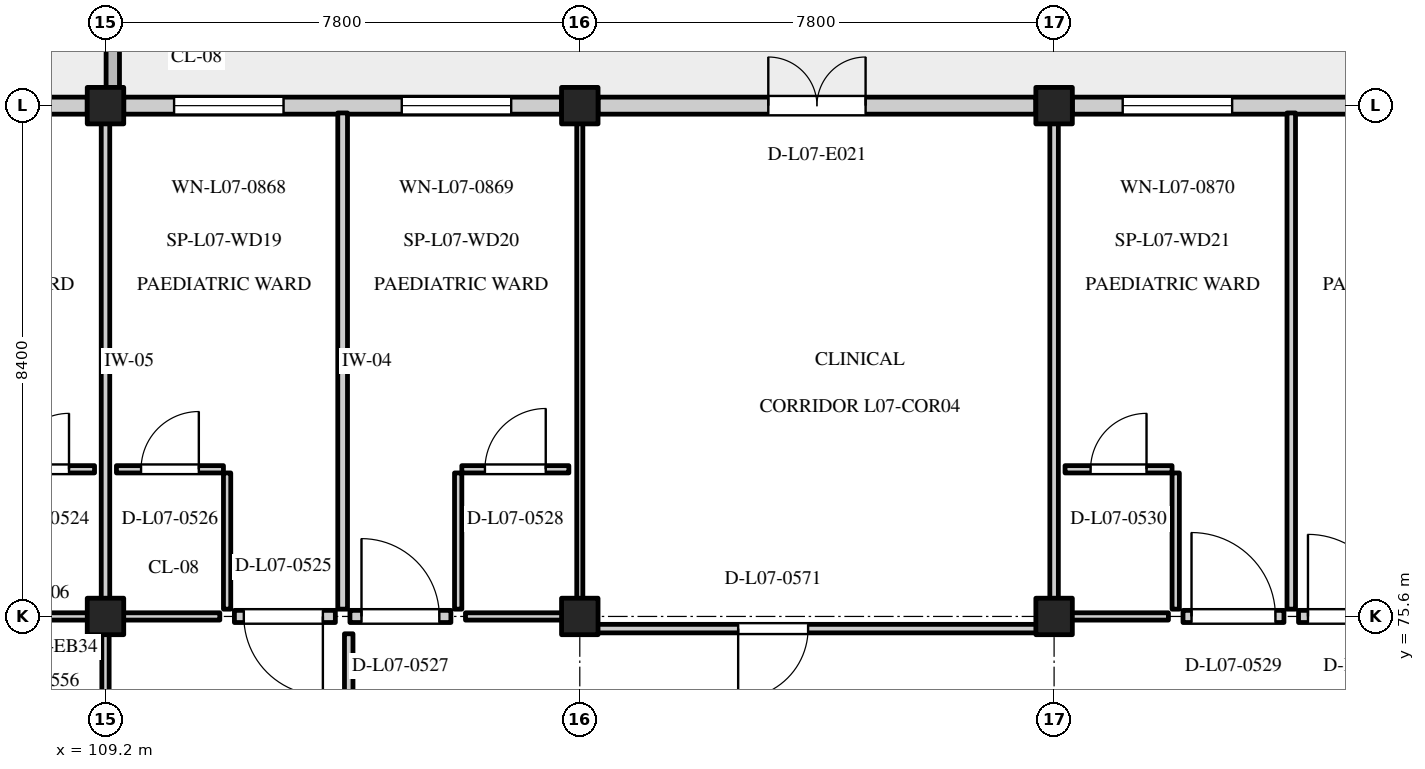
"""IFC4 building model, lengths in metres.
Left out: names, types, materials, properties, quantities, classifications, styles, units other than length and angle.
Written with IfcOpenShell. Run it as: python <this file> out.ifc"""

import sys

from ifc_helpers import new_model, si_unit, direction, frame, frame_2d, origin, origin_2d, place, context, subcontext, project, spatial, rectangle, extrude, element, fill, save


model = new_model("IFC4")
c1 = context("Model", 3, precision=1e-05, world=origin(), true_north=direction((0.0, 1.0)))
c2 = subcontext(c1, "Body", "Model", "MODEL_VIEW")
j1 = project(units=[si_unit("LENGTHUNIT", "METRE"), si_unit("PLANEANGLEUNIT", "RADIAN")], contexts=[c1])
p1 = place(None, origin())
s1 = spatial("IfcSite", under=j1, at=p1, CompositionType="ELEMENT")
p2 = place(p1, origin())
s2 = spatial("IfcBuilding", under=s1, at=p2, CompositionType="ELEMENT")
p3 = place(p2, frame((0.0, 0.0, 29.7)))
s3 = spatial("IfcBuildingStorey", under=s2, at=p3, CompositionType="ELEMENT", Elevation=29.7)
for number, where, z_axis, x_axis in (
    (1, (109.2, 75.6, 0.0), (0.0, 0.0, 1.0), (1.0, 0.0, 0.0)),
    (2, (109.2, 84.0, 0.0), (0.0, 0.0, 1.0), (1.0, 0.0, 0.0)),
    (3, (117.0, 75.6, 0.0), (0.0, 0.0, 1.0), (1.0, 0.0, 0.0)),
    (4, (117.0, 84.0, 0.0), (0.0, 0.0, 1.0), (1.0, 0.0, 0.0)),
    (5, (124.8, 75.6, 0.0), (0.0, 0.0, 1.0), (1.0, 0.0, 0.0)),
    (6, (124.8, 84.0, 0.0), (0.0, 0.0, 1.0), (1.0, 0.0, 0.0)),
):
    element("IfcColumn", number, at=place(p3, frame(where, z_axis=z_axis, x_axis=x_axis)), inside=s3, PredefinedType="COLUMN", context=c2, shape_type="SweptSolid", body=[
        extrude(rectangle(XDim=0.6, YDim=0.6, at=origin_2d()), origin(), (0.0, 0.0, 1.0), 4.2),
    ])
p4 = place(p3, frame((101.7, 84.0, 0.0), z_axis=(0.0, 0.0, 1.0), x_axis=(1.0, 0.0, 0.0)))
e7 = element("IfcWall", 7, at=p4, inside=s3, PredefinedType="STANDARD", context=c2, shape_type="SweptSolid", body=[
    extrude(rectangle(XDim=7.2, YDim=0.28, at=frame_2d((3.6, 0.0))), origin(), (0.0, 0.0, 1.0), 3.25),
])
p5 = place(p4, frame((0.728, 0.0, 0.8)))
e8 = element("IfcOpeningElement", 8, at=p5, cuts=e7, PredefinedType="OPENING", context=c2, shape_type="SweptSolid", body=[
    extrude(rectangle(XDim=2.0, YDim=1.45, at=frame_2d((1.0, 0.725))), frame((0.0, 0.152, 0.0), z_axis=(0.0, -1.0, 0.0), x_axis=(1.0, 0.0, 0.0)), (0.0, 0.0, 1.0), 0.304),
])
p6 = place(p4, frame((4.472, 0.0, 0.8)))
e9 = element("IfcOpeningElement", 9, at=p6, cuts=e7, PredefinedType="OPENING", context=c2, shape_type="SweptSolid", body=[
    extrude(rectangle(XDim=2.0, YDim=1.45, at=frame_2d((1.0, 0.725))), frame((0.0, 0.152, 0.0), z_axis=(0.0, -1.0, 0.0), x_axis=(1.0, 0.0, 0.0)), (0.0, 0.0, 1.0), 0.304),
])
p7 = place(p3, frame((109.5, 84.0, 0.0), z_axis=(0.0, 0.0, 1.0), x_axis=(1.0, 0.0, 0.0)))
e10 = element("IfcWall", 10, at=p7, inside=s3, PredefinedType="STANDARD", context=c2, shape_type="SweptSolid", body=[
    extrude(rectangle(XDim=7.2, YDim=0.28, at=frame_2d((3.6, 0.0))), origin(), (0.0, 0.0, 1.0), 3.25),
])
p8 = place(p7, frame((0.828, 0.0, 0.8)))
e11 = element("IfcOpeningElement", 11, at=p8, cuts=e10, PredefinedType="OPENING", context=c2, shape_type="SweptSolid", body=[
    extrude(rectangle(XDim=1.8, YDim=1.75, at=frame_2d((0.9, 0.875))), frame((0.0, 0.152, 0.0), z_axis=(0.0, -1.0, 0.0), x_axis=(1.0, 0.0, 0.0)), (0.0, 0.0, 1.0), 0.304),
])
p9 = place(p7, frame((4.572, 0.0, 0.8)))
e12 = element("IfcOpeningElement", 12, at=p9, cuts=e10, PredefinedType="OPENING", context=c2, shape_type="SweptSolid", body=[
    extrude(rectangle(XDim=1.8, YDim=1.75, at=frame_2d((0.9, 0.875))), frame((0.0, 0.152, 0.0), z_axis=(0.0, -1.0, 0.0), x_axis=(1.0, 0.0, 0.0)), (0.0, 0.0, 1.0), 0.304),
])
p10 = place(p3, frame((117.3, 84.0, 0.0), z_axis=(0.0, 0.0, 1.0), x_axis=(1.0, 0.0, 0.0)))
e13 = element("IfcWall", 13, at=p10, inside=s3, PredefinedType="STANDARD", context=c2, shape_type="SweptSolid", body=[
    extrude(rectangle(XDim=7.2, YDim=0.28, at=frame_2d((3.6, 0.0))), origin(), (0.0, 0.0, 1.0), 3.25),
])
p11 = place(p10, frame((2.8, 0.0, 0.0)))
e14 = element("IfcOpeningElement", 14, at=p11, cuts=e13, PredefinedType="OPENING", context=c2, shape_type="SweptSolid", body=[
    extrude(rectangle(XDim=1.6, YDim=2.15, at=frame_2d((0.8, 1.075))), frame((0.0, 0.152, 0.0), z_axis=(0.0, -1.0, 0.0), x_axis=(1.0, 0.0, 0.0)), (0.0, 0.0, 1.0), 0.304),
])
p12 = place(p3, frame((125.1, 84.0, 0.0), z_axis=(0.0, 0.0, 1.0), x_axis=(1.0, 0.0, 0.0)))
e15 = element("IfcWall", 15, at=p12, inside=s3, PredefinedType="STANDARD", context=c2, shape_type="SweptSolid", body=[
    extrude(rectangle(XDim=7.2, YDim=0.28, at=frame_2d((3.6, 0.0))), origin(), (0.0, 0.0, 1.0), 3.25),
])
p13 = place(p12, frame((0.828, 0.0, 0.8)))
e16 = element("IfcOpeningElement", 16, at=p13, cuts=e15, PredefinedType="OPENING", context=c2, shape_type="SweptSolid", body=[
    extrude(rectangle(XDim=1.8, YDim=1.55, at=frame_2d((0.9, 0.775))), frame((0.0, 0.152, 0.0), z_axis=(0.0, -1.0, 0.0), x_axis=(1.0, 0.0, 0.0)), (0.0, 0.0, 1.0), 0.304),
])
p14 = place(p12, frame((4.572, 0.0, 0.8)))
e17 = element("IfcOpeningElement", 17, at=p14, cuts=e15, PredefinedType="OPENING", context=c2, shape_type="SweptSolid", body=[
    extrude(rectangle(XDim=1.8, YDim=1.55, at=frame_2d((0.9, 0.775))), frame((0.0, 0.152, 0.0), z_axis=(0.0, -1.0, 0.0), x_axis=(1.0, 0.0, 0.0)), (0.0, 0.0, 1.0), 0.304),
])
p15 = place(p3, frame((109.32, 84.05, 0.0), z_axis=(0.0, 0.0, 1.0), x_axis=(0.0, 1.0, 0.0)))
e18 = element("IfcWall", 18, at=p15, inside=s3, PredefinedType="PARAPET", context=c2, shape_type="SweptSolid", body=[
    extrude(rectangle(XDim=8.3, YDim=0.22, at=frame_2d((4.15, 0.0))), origin(), (0.0, 0.0, 1.0), 1.15),
])
p16 = place(p3, frame((109.2, 75.72, 0.0), z_axis=(0.0, 0.0, 1.0), x_axis=(0.0, 1.0, 0.0)))
e19 = element("IfcWall", 19, at=p16, inside=s3, PredefinedType="PARTITIONING", context=c2, shape_type="SweptSolid", body=[
    extrude(rectangle(XDim=8.16, YDim=0.14, at=frame_2d((4.08, 0.0))), origin(), (0.0, 0.0, 1.0), 3.88),
])
p17 = place(p3, frame((107.32, 75.6, 0.0), z_axis=(0.0, 0.0, 1.0), x_axis=(1.0, 0.0, 0.0)))
e20 = element("IfcWall", 20, at=p17, inside=s3, PredefinedType="PARTITIONING", context=c2, shape_type="SweptSolid", body=[
    extrude(rectangle(XDim=1.76, YDim=0.12, at=frame_2d((0.88, 0.0))), origin(), (0.0, 0.0, 1.0), 3.25),
])
p18 = place(p3, frame((107.26, 78.02, 0.0), z_axis=(0.0, 0.0, 1.0), x_axis=(1.0, 0.0, 0.0)))
e21 = element("IfcWall", 21, at=p18, inside=s3, PredefinedType="PARTITIONING", context=c2, shape_type="SweptSolid", body=[
    extrude(rectangle(XDim=1.76, YDim=0.12, at=frame_2d((0.88, 0.0))), origin(), (0.0, 0.0, 1.0), 3.88),
])
p19 = place(p18, frame((0.42, 0.0, 0.0)))
e22 = element("IfcOpeningElement", 22, at=p19, cuts=e21, PredefinedType="OPENING", context=c2, shape_type="SweptSolid", body=[
    extrude(rectangle(XDim=0.92, YDim=2.08, at=frame_2d((0.46, 1.04))), frame((0.0, 0.072, 0.0), z_axis=(0.0, -1.0, 0.0), x_axis=(1.0, 0.0, 0.0)), (0.0, 0.0, 1.0), 0.144),
])
p20 = place(p3, frame((113.1, 75.72, 0.0), z_axis=(0.0, 0.0, 1.0), x_axis=(0.0, 1.0, 0.0)))
e23 = element("IfcWall", 23, at=p20, inside=s3, PredefinedType="PARTITIONING", context=c2, shape_type="SweptSolid", body=[
    extrude(rectangle(XDim=8.16, YDim=0.16, at=frame_2d((4.08, 0.0))), origin(), (0.0, 0.0, 1.0), 3.88),
])
p21 = place(p3, frame((111.32, 75.6, 0.0), z_axis=(0.0, 0.0, 1.0), x_axis=(1.0, 0.0, 0.0)))
e24 = element("IfcWall", 24, at=p21, inside=s3, PredefinedType="STANDARD", context=c2, shape_type="SweptSolid", body=[
    extrude(rectangle(XDim=1.66, YDim=0.2, at=frame_2d((0.83, 0.0))), origin(), (0.0, 0.0, 1.0), 3.25),
])
p22 = place(p21, frame((0.155, 0.0, 0.0)))
e25 = element("IfcOpeningElement", 25, at=p22, cuts=e24, PredefinedType="OPENING", context=c2, shape_type="SweptSolid", body=[
    extrude(rectangle(XDim=1.3, YDim=2.15, at=frame_2d((0.65, 1.075))), frame((0.0, 0.112, 0.0), z_axis=(0.0, -1.0, 0.0), x_axis=(1.0, 0.0, 0.0)), (0.0, 0.0, 1.0), 0.224),
])
p23 = place(p3, frame((109.32, 75.6, 0.0), z_axis=(0.0, 0.0, 1.0), x_axis=(1.0, 0.0, 0.0)))
e26 = element("IfcWall", 26, at=p23, inside=s3, PredefinedType="PARTITIONING", context=c2, shape_type="SweptSolid", body=[
    extrude(rectangle(XDim=1.76, YDim=0.12, at=frame_2d((0.88, 0.0))), origin(), (0.0, 0.0, 1.0), 3.25),
])
p24 = place(p3, frame((111.2, 75.72, 0.0), z_axis=(0.0, 0.0, 1.0), x_axis=(0.0, 1.0, 0.0)))
e27 = element("IfcWall", 27, at=p24, inside=s3, PredefinedType="PARTITIONING", context=c2, shape_type="SweptSolid", body=[
    extrude(rectangle(XDim=2.24, YDim=0.12, at=frame_2d((1.12, 0.0))), origin(), (0.0, 0.0, 1.0), 3.88),
])
p25 = place(p3, frame((109.38, 78.02, 0.0), z_axis=(0.0, 0.0, 1.0), x_axis=(1.0, 0.0, 0.0)))
e28 = element("IfcWall", 28, at=p25, inside=s3, PredefinedType="PARTITIONING", context=c2, shape_type="SweptSolid", body=[
    extrude(rectangle(XDim=1.76, YDim=0.12, at=frame_2d((0.88, 0.0))), origin(), (0.0, 0.0, 1.0), 3.88),
])
p26 = place(p25, frame((0.405, 0.0, 0.0)))
e29 = element("IfcOpeningElement", 29, at=p26, cuts=e28, PredefinedType="OPENING", context=c2, shape_type="SweptSolid", body=[
    extrude(rectangle(XDim=0.95, YDim=2.1, at=frame_2d((0.475, 1.05))), frame((0.0, 0.072, 0.0), z_axis=(0.0, -1.0, 0.0), x_axis=(1.0, 0.0, 0.0)), (0.0, 0.0, 1.0), 0.144),
])
p27 = place(p3, frame((117.0, 75.72, 0.0), z_axis=(0.0, 0.0, 1.0), x_axis=(0.0, 1.0, 0.0)))
e30 = element("IfcWall", 30, at=p27, inside=s3, PredefinedType="PARTITIONING", context=c2, shape_type="SweptSolid", body=[
    extrude(rectangle(XDim=8.16, YDim=0.1, at=frame_2d((4.08, 0.0))), origin(), (0.0, 0.0, 1.0), 3.25),
])
p28 = place(p3, frame((113.22, 75.6, 0.0), z_axis=(0.0, 0.0, 1.0), x_axis=(1.0, 0.0, 0.0)))
e31 = element("IfcWall", 31, at=p28, inside=s3, PredefinedType="STANDARD", context=c2, shape_type="SweptSolid", body=[
    extrude(rectangle(XDim=1.66, YDim=0.2, at=frame_2d((0.83, 0.0))), origin(), (0.0, 0.0, 1.0), 3.25),
])
p29 = place(p28, frame((0.19, 0.0, 0.0)))
e32 = element("IfcOpeningElement", 32, at=p29, cuts=e31, PredefinedType="OPENING", context=c2, shape_type="SweptSolid", body=[
    extrude(rectangle(XDim=1.28, YDim=2.15, at=frame_2d((0.64, 1.075))), frame((0.0, 0.112, 0.0), z_axis=(0.0, -1.0, 0.0), x_axis=(1.0, 0.0, 0.0)), (0.0, 0.0, 1.0), 0.224),
])
p30 = place(p3, frame((115.12, 75.6, 0.0), z_axis=(0.0, 0.0, 1.0), x_axis=(1.0, 0.0, 0.0)))
e33 = element("IfcWall", 33, at=p30, inside=s3, PredefinedType="PARTITIONING", context=c2, shape_type="SweptSolid", body=[
    extrude(rectangle(XDim=1.76, YDim=0.12, at=frame_2d((0.88, 0.0))), origin(), (0.0, 0.0, 1.0), 3.25),
])
p31 = place(p3, frame((115.0, 75.72, 0.0), z_axis=(0.0, 0.0, 1.0), x_axis=(0.0, 1.0, 0.0)))
e34 = element("IfcWall", 34, at=p31, inside=s3, PredefinedType="PARTITIONING", context=c2, shape_type="SweptSolid", body=[
    extrude(rectangle(XDim=2.24, YDim=0.12, at=frame_2d((1.12, 0.0))), origin(), (0.0, 0.0, 1.0), 3.88),
])
p32 = place(p3, frame((115.06, 78.02, 0.0), z_axis=(0.0, 0.0, 1.0), x_axis=(1.0, 0.0, 0.0)))
e35 = element("IfcWall", 35, at=p32, inside=s3, PredefinedType="PARTITIONING", context=c2, shape_type="SweptSolid", body=[
    extrude(rectangle(XDim=1.76, YDim=0.12, at=frame_2d((0.88, 0.0))), origin(), (0.0, 0.0, 1.0), 3.88),
])
p33 = place(p32, frame((0.38, 0.0, 0.0)))
e36 = element("IfcOpeningElement", 36, at=p33, cuts=e35, PredefinedType="OPENING", context=c2, shape_type="SweptSolid", body=[
    extrude(rectangle(XDim=1.0, YDim=2.1, at=frame_2d((0.5, 1.05))), frame((0.0, 0.072, 0.0), z_axis=(0.0, -1.0, 0.0), x_axis=(1.0, 0.0, 0.0)), (0.0, 0.0, 1.0), 0.144),
])
for number, where, z_axis, x_axis in (
    (37, (124.8, 75.72, 0.0), (0.0, 0.0, 1.0), (0.0, 1.0, 0.0)),
    (38, (128.7, 75.72, 0.0), (0.0, 0.0, 1.0), (0.0, 1.0, 0.0)),
):
    element("IfcWall", number, at=place(p3, frame(where, z_axis=z_axis, x_axis=x_axis)), inside=s3, PredefinedType="PARTITIONING", context=c2, shape_type="SweptSolid", body=[
        extrude(rectangle(XDim=8.16, YDim=0.14, at=frame_2d((4.08, 0.0))), origin(), (0.0, 0.0, 1.0), 3.88),
    ])
p34 = place(p3, frame((126.92, 75.6, 0.0), z_axis=(0.0, 0.0, 1.0), x_axis=(1.0, 0.0, 0.0)))
e39 = element("IfcWall", 39, at=p34, inside=s3, PredefinedType="STANDARD", context=c2, shape_type="SweptSolid", body=[
    extrude(rectangle(XDim=1.66, YDim=0.2, at=frame_2d((0.83, 0.0))), origin(), (0.0, 0.0, 1.0), 3.25),
])
p35 = place(p34, frame((0.14, 0.0, 0.0)))
e40 = element("IfcOpeningElement", 40, at=p35, cuts=e39, PredefinedType="OPENING", context=c2, shape_type="SweptSolid", body=[
    extrude(rectangle(XDim=1.38, YDim=2.2, at=frame_2d((0.69, 1.1))), frame((0.0, 0.112, 0.0), z_axis=(0.0, -1.0, 0.0), x_axis=(1.0, 0.0, 0.0)), (0.0, 0.0, 1.0), 0.224),
])
p36 = place(p3, frame((124.92, 75.6, 0.0), z_axis=(0.0, 0.0, 1.0), x_axis=(1.0, 0.0, 0.0)))
e41 = element("IfcWall", 41, at=p36, inside=s3, PredefinedType="PARTITIONING", context=c2, shape_type="SweptSolid", body=[
    extrude(rectangle(XDim=1.76, YDim=0.12, at=frame_2d((0.88, 0.0))), origin(), (0.0, 0.0, 1.0), 3.25),
])
p37 = place(p3, frame((126.8, 75.72, 0.0), z_axis=(0.0, 0.0, 1.0), x_axis=(0.0, 1.0, 0.0)))
e42 = element("IfcWall", 42, at=p37, inside=s3, PredefinedType="PARTITIONING", context=c2, shape_type="SweptSolid", body=[
    extrude(rectangle(XDim=2.24, YDim=0.12, at=frame_2d((1.12, 0.0))), origin(), (0.0, 0.0, 1.0), 3.88),
])
p38 = place(p3, frame((124.98, 78.02, 0.0), z_axis=(0.0, 0.0, 1.0), x_axis=(1.0, 0.0, 0.0)))
e43 = element("IfcWall", 43, at=p38, inside=s3, PredefinedType="PARTITIONING", context=c2, shape_type="SweptSolid", body=[
    extrude(rectangle(XDim=1.76, YDim=0.12, at=frame_2d((0.88, 0.0))), origin(), (0.0, 0.0, 1.0), 3.88),
])
p39 = place(p38, frame((0.42, 0.0, 0.0)))
e44 = element("IfcOpeningElement", 44, at=p39, cuts=e43, PredefinedType="OPENING", context=c2, shape_type="SweptSolid", body=[
    extrude(rectangle(XDim=0.92, YDim=2.08, at=frame_2d((0.46, 1.04))), frame((0.0, 0.072, 0.0), z_axis=(0.0, -1.0, 0.0), x_axis=(1.0, 0.0, 0.0)), (0.0, 0.0, 1.0), 0.144),
])
p40 = place(p3, frame((128.82, 75.6, 0.0), z_axis=(0.0, 0.0, 1.0), x_axis=(1.0, 0.0, 0.0)))
e45 = element("IfcWall", 45, at=p40, inside=s3, PredefinedType="STANDARD", context=c2, shape_type="SweptSolid", body=[
    extrude(rectangle(XDim=1.66, YDim=0.2, at=frame_2d((0.83, 0.0))), origin(), (0.0, 0.0, 1.0), 3.25),
])
p41 = place(p40, frame((0.155, 0.0, 0.0)))
e46 = element("IfcOpeningElement", 46, at=p41, cuts=e45, PredefinedType="OPENING", context=c2, shape_type="SweptSolid", body=[
    extrude(rectangle(XDim=1.35, YDim=2.15, at=frame_2d((0.675, 1.075))), frame((0.0, 0.112, 0.0), z_axis=(0.0, -1.0, 0.0), x_axis=(1.0, 0.0, 0.0)), (0.0, 0.0, 1.0), 0.224),
])
p42 = place(p3, frame((109.2, 73.72, 0.0), z_axis=(0.0, 0.0, 1.0), x_axis=(0.0, 1.0, 0.0)))
e47 = element("IfcWall", 47, at=p42, inside=s3, PredefinedType="PARTITIONING", context=c2, shape_type="SweptSolid", body=[
    extrude(rectangle(XDim=1.76, YDim=0.12, at=frame_2d((0.88, 0.0))), origin(), (0.0, 0.0, 1.0), 3.88),
])
p43 = place(p3, frame((116.92, 75.4, 0.0), z_axis=(0.0, 0.0, 1.0), x_axis=(1.0, 0.0, 0.0)))
e48 = element("IfcWall", 48, at=p43, inside=s3, PredefinedType="PARTITIONING", context=c2, shape_type="SweptSolid", body=[
    extrude(rectangle(XDim=7.96, YDim=0.14, at=frame_2d((3.98, 0.0))), origin(), (0.0, 0.0, 1.0), 3.25),
])
p44 = place(p43, frame((2.684, 0.0, 0.0)))
e49 = element("IfcOpeningElement", 49, at=p44, cuts=e48, PredefinedType="OPENING", context=c2, shape_type="SweptSolid", body=[
    extrude(rectangle(XDim=1.15, YDim=2.15, at=frame_2d((0.575, 1.075))), frame((0.0, 0.082, 0.0), z_axis=(0.0, -1.0, 0.0), x_axis=(1.0, 0.0, 0.0)), (0.0, 0.0, 1.0), 0.164),
])
p45 = place(p3, frame((113.2, 72.085, 0.0), z_axis=(0.0, 0.0, 1.0), x_axis=(0.0, 1.0, 0.0)))
e50 = element("IfcWall", 50, at=p45, inside=s3, PredefinedType="PARTITIONING", context=c2, shape_type="SweptSolid", body=[
    extrude(rectangle(XDim=3.23, YDim=0.14, at=frame_2d((1.615, 0.0))), origin(), (0.0, 0.0, 1.0), 3.88),
])
p46 = place(p45, frame((0.99, 0.0, 0.0)))
e51 = element("IfcOpeningElement", 51, at=p46, cuts=e50, PredefinedType="OPENING", context=c2, shape_type="SweptSolid", body=[
    extrude(rectangle(XDim=1.05, YDim=2.1, at=frame_2d((0.525, 1.05))), frame((0.0, 0.082, 0.0), z_axis=(0.0, -1.0, 0.0), x_axis=(1.0, 0.0, 0.0)), (0.0, 0.0, 1.0), 0.164),
])
p47 = place(p8, origin())
e52 = element("IfcWindow", 52, at=p47, inside=s3, PartitioningType="DOUBLE_PANEL_VERTICAL", PredefinedType="WINDOW", context=c2, shape_type="SweptSolid", body=[
    extrude(rectangle(XDim=1.8, YDim=1.75, at=frame_2d((0.9, 0.875))), frame((0.0, 0.03, 0.0), z_axis=(0.0, -1.0, 0.0), x_axis=(1.0, 0.0, 0.0)), (0.0, 0.0, 1.0), 0.06),
])
fill(e11, e52)
p48 = place(p9, origin())
e53 = element("IfcWindow", 53, at=p48, inside=s3, PartitioningType="DOUBLE_PANEL_VERTICAL", PredefinedType="WINDOW", context=c2, shape_type="SweptSolid", body=[
    extrude(rectangle(XDim=1.8, YDim=1.75, at=frame_2d((0.9, 0.875))), frame((0.0, 0.03, 0.0), z_axis=(0.0, -1.0, 0.0), x_axis=(1.0, 0.0, 0.0)), (0.0, 0.0, 1.0), 0.06),
])
fill(e12, e53)
p49 = place(p11, origin())
e54 = element("IfcDoor", 54, at=p49, inside=s3, OperationType="DOUBLE_DOOR_SINGLE_SWING", PredefinedType="DOOR", context=c2, shape_type="SweptSolid", body=[
    extrude(rectangle(XDim=1.6, YDim=2.15, at=frame_2d((0.8, 1.075))), frame((0.0, 0.025, 0.0), z_axis=(0.0, -1.0, 0.0), x_axis=(1.0, 0.0, 0.0)), (0.0, 0.0, 1.0), 0.05),
])
fill(e14, e54)
p50 = place(p13, origin())
e55 = element("IfcWindow", 55, at=p50, inside=s3, PartitioningType="DOUBLE_PANEL_VERTICAL", PredefinedType="WINDOW", context=c2, shape_type="SweptSolid", body=[
    extrude(rectangle(XDim=1.8, YDim=1.55, at=frame_2d((0.9, 0.775))), frame((0.0, 0.03, 0.0), z_axis=(0.0, -1.0, 0.0), x_axis=(1.0, 0.0, 0.0)), (0.0, 0.0, 1.0), 0.06),
])
fill(e16, e55)
p51 = place(p19, frame((0.92, 0.0, 0.0), z_axis=(0.0, 0.0, 1.0), x_axis=(-1.0, 0.0, 0.0)))
e56 = element("IfcDoor", 56, at=p51, inside=s3, OperationType="SINGLE_SWING_LEFT", PredefinedType="DOOR", context=c2, shape_type="SweptSolid", body=[
    extrude(rectangle(XDim=0.92, YDim=2.08, at=frame_2d((0.46, 1.04))), frame((0.0, 0.025, 0.0), z_axis=(0.0, -1.0, 0.0), x_axis=(1.0, 0.0, 0.0)), (0.0, 0.0, 1.0), 0.05),
])
fill(e22, e56)
p52 = place(p22, origin())
e57 = element("IfcDoor", 57, at=p52, inside=s3, OperationType="SINGLE_SWING_RIGHT", PredefinedType="DOOR", context=c2, shape_type="SweptSolid", body=[
    extrude(rectangle(XDim=1.3, YDim=2.15, at=frame_2d((0.65, 1.075))), frame((0.0, 0.025, 0.0), z_axis=(0.0, -1.0, 0.0), x_axis=(1.0, 0.0, 0.0)), (0.0, 0.0, 1.0), 0.05),
])
fill(e25, e57)
p53 = place(p26, frame((0.95, 0.0, 0.0), z_axis=(0.0, 0.0, 1.0), x_axis=(-1.0, 0.0, 0.0)))
e58 = element("IfcDoor", 58, at=p53, inside=s3, OperationType="SINGLE_SWING_LEFT", PredefinedType="DOOR", context=c2, shape_type="SweptSolid", body=[
    extrude(rectangle(XDim=0.95, YDim=2.1, at=frame_2d((0.475, 1.05))), frame((0.0, 0.025, 0.0), z_axis=(0.0, -1.0, 0.0), x_axis=(1.0, 0.0, 0.0)), (0.0, 0.0, 1.0), 0.05),
])
fill(e29, e58)
p54 = place(p29, origin())
e59 = element("IfcDoor", 59, at=p54, inside=s3, OperationType="SINGLE_SWING_LEFT", PredefinedType="DOOR", context=c2, shape_type="SweptSolid", body=[
    extrude(rectangle(XDim=1.28, YDim=2.15, at=frame_2d((0.64, 1.075))), frame((0.0, 0.025, 0.0), z_axis=(0.0, -1.0, 0.0), x_axis=(1.0, 0.0, 0.0)), (0.0, 0.0, 1.0), 0.05),
])
fill(e32, e59)
p55 = place(p33, frame((1.0, 0.0, 0.0), z_axis=(0.0, 0.0, 1.0), x_axis=(-1.0, 0.0, 0.0)))
e60 = element("IfcDoor", 60, at=p55, inside=s3, OperationType="SINGLE_SWING_LEFT", PredefinedType="DOOR", context=c2, shape_type="SweptSolid", body=[
    extrude(rectangle(XDim=1.0, YDim=2.1, at=frame_2d((0.5, 1.05))), frame((0.0, 0.025, 0.0), z_axis=(0.0, -1.0, 0.0), x_axis=(1.0, 0.0, 0.0)), (0.0, 0.0, 1.0), 0.05),
])
fill(e36, e60)
p56 = place(p35, origin())
e61 = element("IfcDoor", 61, at=p56, inside=s3, OperationType="SINGLE_SWING_LEFT", PredefinedType="DOOR", context=c2, shape_type="SweptSolid", body=[
    extrude(rectangle(XDim=1.38, YDim=2.2, at=frame_2d((0.69, 1.1))), frame((0.0, 0.025, 0.0), z_axis=(0.0, -1.0, 0.0), x_axis=(1.0, 0.0, 0.0)), (0.0, 0.0, 1.0), 0.05),
])
fill(e40, e61)
p57 = place(p39, frame((0.92, 0.0, 0.0), z_axis=(0.0, 0.0, 1.0), x_axis=(-1.0, 0.0, 0.0)))
e62 = element("IfcDoor", 62, at=p57, inside=s3, OperationType="SINGLE_SWING_LEFT", PredefinedType="DOOR", context=c2, shape_type="SweptSolid", body=[
    extrude(rectangle(XDim=0.92, YDim=2.08, at=frame_2d((0.46, 1.04))), frame((0.0, 0.025, 0.0), z_axis=(0.0, -1.0, 0.0), x_axis=(1.0, 0.0, 0.0)), (0.0, 0.0, 1.0), 0.05),
])
fill(e44, e62)
p58 = place(p41, origin())
e63 = element("IfcDoor", 63, at=p58, inside=s3, OperationType="SINGLE_SWING_LEFT", PredefinedType="DOOR", context=c2, shape_type="SweptSolid", body=[
    extrude(rectangle(XDim=1.35, YDim=2.15, at=frame_2d((0.675, 1.075))), frame((0.0, 0.025, 0.0), z_axis=(0.0, -1.0, 0.0), x_axis=(1.0, 0.0, 0.0)), (0.0, 0.0, 1.0), 0.05),
])
fill(e46, e63)
p59 = place(p44, frame((1.15, 0.0, 0.0), z_axis=(0.0, 0.0, 1.0), x_axis=(-1.0, 0.0, 0.0)))
e64 = element("IfcDoor", 64, at=p59, inside=s3, OperationType="SINGLE_SWING_RIGHT", PredefinedType="DOOR", context=c2, shape_type="SweptSolid", body=[
    extrude(rectangle(XDim=1.15, YDim=2.15, at=frame_2d((0.575, 1.075))), frame((0.0, 0.025, 0.0), z_axis=(0.0, -1.0, 0.0), x_axis=(1.0, 0.0, 0.0)), (0.0, 0.0, 1.0), 0.05),
])
fill(e49, e64)
save(model, sys.argv[1])
